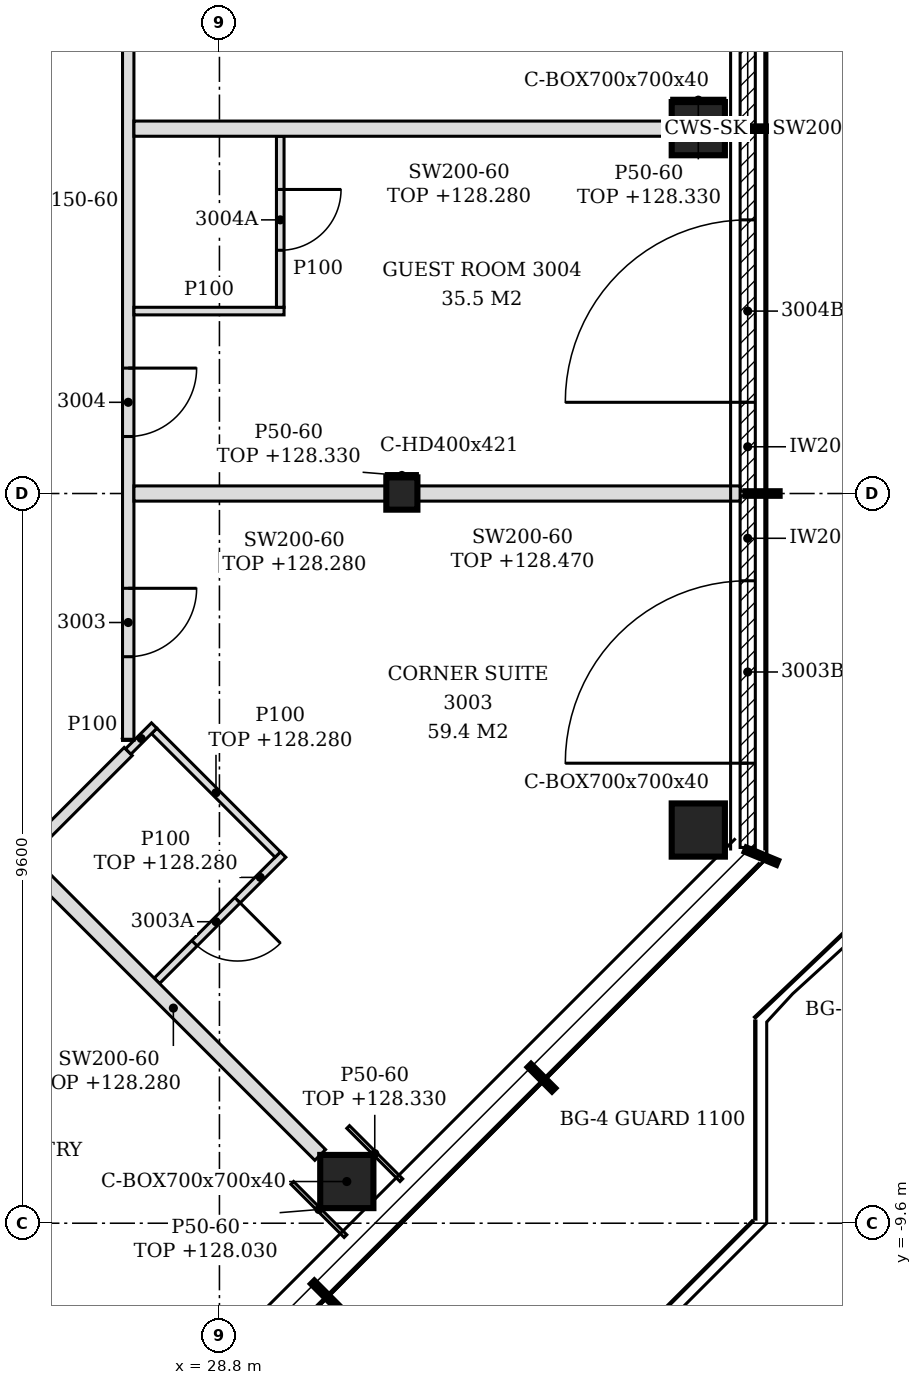
"""IFC4 building model, lengths in metres.
Left out: names, types, materials, properties, quantities, classifications, styles, units other than length and angle.
Written with IfcOpenShell. Run it as: python <this file> out.ifc"""

import sys

from ifc_helpers import new_model, si_unit, direction, frame, frame_2d, origin, origin_2d, place, context, subcontext, project, spatial, polyline, rectangle, hollow_rectangle, i_section, outline, extrude, element, fill, save


model = new_model("IFC4")
c1 = context("Model", 3, precision=1e-05, world=origin(), true_north=direction((0.0, 1.0)))
c2 = subcontext(c1, "Body", "Model", "MODEL_VIEW")
j1 = project(units=[si_unit("LENGTHUNIT", "METRE"), si_unit("PLANEANGLEUNIT", "RADIAN")], contexts=[c1])
p1 = place(None, origin())
s1 = spatial("IfcSite", under=j1, at=p1, CompositionType="ELEMENT")
p2 = place(p1, origin())
s2 = spatial("IfcBuilding", under=s1, at=p2, CompositionType="ELEMENT")
p3 = place(p2, frame((0.0, 0.0, 125.4)))
s3 = spatial("IfcBuildingStorey", under=s2, at=p3, CompositionType="ELEMENT", Elevation=125.4)
for number, where, z_axis, x_axis in (
    (1, (30.476, -9.052, -0.15), (0.0, 0.0, 1.0), (1.0, 0.0, 0.0)),
    (2, (35.1, -4.427, -0.15), (0.0, 0.0, 1.0), (1.0, 0.0, 0.0)),
    (3, (35.1, 4.8, -0.15), (0.0, 0.0, 1.0), (1.0, 0.0, 0.0)),
):
    element("IfcColumn", number, at=place(p3, frame(where, z_axis=z_axis, x_axis=x_axis)), inside=s3, PredefinedType="COLUMN", context=c2, shape_type="SweptSolid", body=[
        extrude(hollow_rectangle(XDim=0.7, YDim=0.7, WallThickness=0.04, at=origin_2d()), origin(), (0.0, 0.0, 1.0), 3.6),
    ])
p4 = place(p3, frame((31.2, 0.0, -0.15), z_axis=(0.0, 0.0, 1.0), x_axis=(1.0, 0.0, 0.0)))
e4 = element("IfcColumn", 4, at=p4, inside=s3, PredefinedType="COLUMN", context=c2, shape_type="SweptSolid", body=[
    extrude(i_section(OverallWidth=0.409, OverallDepth=0.425, WebThickness=0.033, FlangeThickness=0.052, FilletRadius=0.015, at=origin_2d()), origin(), (0.0, 0.0, 1.0), 3.6),
])
p5 = place(p3, frame((35.75, -4.656, 0.0), z_axis=(0.0, 0.0, 1.0), x_axis=(0.0, 1.0, 0.0)))
e5 = element("IfcWall", 5, at=p5, inside=s3, PredefinedType="NOTDEFINED", context=c2, shape_type="SweptSolid", body=[
    extrude(rectangle(XDim=4.626, YDim=0.2, at=frame_2d((2.313, 0.0))), origin(), (0.0, 0.0, 1.0), 3.45),
])
p6 = place(p5, frame((1.108, 0.0, 0.0)))
e6 = element("IfcOpeningElement", 6, at=p6, cuts=e5, PredefinedType="OPENING", context=c2, shape_type="SweptSolid", body=[
    extrude(rectangle(XDim=2.4, YDim=2.4, at=frame_2d((1.2, 1.2))), frame((0.0, 0.11, 0.0), z_axis=(0.0, -1.0, 0.0), x_axis=(1.0, 0.0, 0.0)), (0.0, 0.0, 1.0), 0.22),
])
p7 = place(p3, frame((35.75, 0.03, 0.0), z_axis=(0.0, 0.0, 1.0), x_axis=(0.0, 1.0, 0.0)))
e7 = element("IfcWall", 7, at=p7, inside=s3, PredefinedType="NOTDEFINED", context=c2, shape_type="SweptSolid", body=[
    extrude(rectangle(XDim=4.74, YDim=0.2, at=frame_2d((2.37, 0.0))), origin(), (0.0, 0.0, 1.0), 3.45),
])
p8 = place(p7, frame((1.17, 0.0, 0.0)))
e8 = element("IfcOpeningElement", 8, at=p8, cuts=e7, PredefinedType="OPENING", context=c2, shape_type="SweptSolid", body=[
    extrude(rectangle(XDim=2.4, YDim=2.4, at=frame_2d((1.2, 1.2))), frame((0.0, 0.11, 0.0), z_axis=(0.0, -1.0, 0.0), x_axis=(1.0, 0.0, 0.0)), (0.0, 0.0, 1.0), 0.22),
])
p9 = place(p3, frame((35.75, 4.83, 0.0), z_axis=(0.0, 0.0, 1.0), x_axis=(0.0, 1.0, 0.0)))
e9 = element("IfcWall", 9, at=p9, inside=s3, PredefinedType="NOTDEFINED", context=c2, shape_type="SweptSolid", body=[
    extrude(rectangle(XDim=4.74, YDim=0.2, at=frame_2d((2.37, 0.0))), origin(), (0.0, 0.0, 1.0), 3.45),
])
p10 = place(p9, frame((1.17, 0.0, 0.0)))
e10 = element("IfcOpeningElement", 10, at=p10, cuts=e9, PredefinedType="OPENING", context=c2, shape_type="SweptSolid", body=[
    extrude(rectangle(XDim=2.4, YDim=2.4, at=frame_2d((1.2, 1.2))), frame((0.0, 0.11, 0.0), z_axis=(0.0, -1.0, 0.0), x_axis=(1.0, 0.0, 0.0)), (0.0, 0.0, 1.0), 0.22),
])
p11 = place(p3, frame((30.125, -8.702, 0.0), z_axis=(0.0, 0.0, 1.0), x_axis=(-0.707084440093, 0.707129121574, 0.0)))
e11 = element("IfcWall", 11, at=p11, inside=s3, PredefinedType="PARTITIONING", context=c2, shape_type="SweptSolid", body=[
    extrude(rectangle(XDim=5.464, YDim=0.2, at=frame_2d((2.732, 0.0))), origin(), (0.0, 0.0, 1.0), 2.88),
])
p12 = place(p3, frame((22.722, -8.272, 0.0), z_axis=(0.0, 0.0, 1.0), x_axis=(0.707124475887, 0.707089086043, 0.0)))
e12 = element("IfcWall", 12, at=p12, inside=s3, PredefinedType="PARTITIONING", context=c2, shape_type="SweptSolid", body=[
    extrude(rectangle(XDim=6.899, YDim=0.15, at=frame_2d((3.449, 0.0))), origin(), (0.0, 0.0, 1.0), 2.88),
])
p13 = place(p12, frame((1.925, 0.0, 0.0)))
e13 = element("IfcOpeningElement", 13, at=p13, cuts=e12, PredefinedType="OPENING", context=c2, shape_type="SweptSolid", body=[
    extrude(rectangle(XDim=0.9, YDim=2.1, at=frame_2d((0.45, 1.05))), frame((0.0, 0.085, 0.0), z_axis=(0.0, -1.0, 0.0), x_axis=(1.0, 0.0, 0.0)), (0.0, 0.0, 1.0), 0.17),
])
p14 = place(p3, frame((27.977, -6.411, 0.0), z_axis=(0.0, 0.0, 1.0), x_axis=(0.707054828152, 0.707158730404, 0.0)))
e14 = element("IfcWall", 14, at=p14, inside=s3, PredefinedType="PARTITIONING", context=c2, shape_type="SweptSolid", body=[
    extrude(rectangle(XDim=2.35, YDim=0.1, at=frame_2d((1.175, 0.0))), origin(), (0.0, 0.0, 1.0), 2.88),
])
p15 = place(p14, frame((0.7, 0.0, 0.0)))
e15 = element("IfcOpeningElement", 15, at=p15, cuts=e14, PredefinedType="OPENING", context=c2, shape_type="SweptSolid", body=[
    extrude(rectangle(XDim=0.8, YDim=2.1, at=frame_2d((0.4, 1.05))), frame((0.0, 0.06, 0.0), z_axis=(0.0, -1.0, 0.0), x_axis=(1.0, 0.0, 0.0)), (0.0, 0.0, 1.0), 0.12),
])
p16 = place(p3, frame((29.568, -4.75, 0.0), z_axis=(0.0, 0.0, 1.0), x_axis=(-0.707106781187, 0.707106781187, 0.0)))
e16 = element("IfcWall", 16, at=p16, inside=s3, PredefinedType="PARTITIONING", context=c2, shape_type="SweptSolid", body=[
    extrude(rectangle(XDim=2.3, YDim=0.1, at=frame_2d((1.15, 0.0))), origin(), (0.0, 0.0, 1.0), 2.88),
])
p17 = place(p3, frame((27.6, -3.394, 0.0), z_axis=(0.0, 0.0, 1.0), x_axis=(0.707106781187, 0.707106781187, 0.0)))
e17 = element("IfcWall", 17, at=p17, inside=s3, PredefinedType="PARTITIONING", context=c2, shape_type="SweptSolid", body=[
    extrude(rectangle(XDim=0.483, YDim=0.1, at=frame_2d((0.241, 0.0))), origin(), (0.0, 0.0, 1.0), 3.45),
])
p18 = place(p3, frame((27.6, -3.248, 0.0), z_axis=(0.0, 0.0, 1.0), x_axis=(0.0, 1.0, 0.0)))
e18 = element("IfcWall", 18, at=p18, inside=s3, PredefinedType="PARTITIONING", context=c2, shape_type="SweptSolid", body=[
    extrude(outline(polyline([(0.0, 0.0), (11.548, 0.0), (11.548, 3.45), (8.153, 3.45), (8.151, 2.88), (7.943, 2.88), (7.941, 3.45), (3.353, 3.45), (3.351, 2.88), (3.143, 2.88), (3.141, 3.45), (0.0, 3.45), (0.0, 0.0)])), frame((0.0, 0.075, 0.0), z_axis=(0.0, -1.0, 0.0), x_axis=(1.0, 0.0, 0.0)), (0.0, 0.0, 1.0), 0.15),
])
p19 = place(p18, frame((1.101, 0.0, 0.0)))
e19 = element("IfcOpeningElement", 19, at=p19, cuts=e18, PredefinedType="OPENING", context=c2, shape_type="SweptSolid", body=[
    extrude(rectangle(XDim=0.9, YDim=2.1, at=frame_2d((0.45, 1.05))), frame((0.0, 0.085, 0.0), z_axis=(0.0, -1.0, 0.0), x_axis=(1.0, 0.0, 0.0)), (0.0, 0.0, 1.0), 0.17),
])
p20 = place(p18, frame((3.998, 0.0, 0.0)))
e20 = element("IfcOpeningElement", 20, at=p20, cuts=e18, PredefinedType="OPENING", context=c2, shape_type="SweptSolid", body=[
    extrude(rectangle(XDim=0.9, YDim=2.1, at=frame_2d((0.45, 1.05))), frame((0.0, 0.085, 0.0), z_axis=(0.0, -1.0, 0.0), x_axis=(1.0, 0.0, 0.0)), (0.0, 0.0, 1.0), 0.17),
])
p21 = place(p18, frame((9.295, 0.0, 0.0)))
e21 = element("IfcOpeningElement", 21, at=p21, cuts=e18, PredefinedType="OPENING", context=c2, shape_type="SweptSolid", body=[
    extrude(rectangle(XDim=0.9, YDim=2.1, at=frame_2d((0.45, 1.05))), frame((0.0, 0.085, 0.0), z_axis=(0.0, -1.0, 0.0), x_axis=(1.0, 0.0, 0.0)), (0.0, 0.0, 1.0), 0.17),
])
p22 = place(p3, frame((27.675, 0.0, 0.0), z_axis=(0.0, 0.0, 1.0), x_axis=(1.0, 0.0, 0.0)))
e22 = element("IfcWall", 22, at=p22, inside=s3, PredefinedType="PARTITIONING", context=c2, shape_type="SweptSolid", body=[
    extrude(rectangle(XDim=3.321, YDim=0.2, at=frame_2d((1.66, 0.0))), origin(), (0.0, 0.0, 1.0), 2.88),
])
p23 = place(p3, frame((31.405, 0.0, 0.0), z_axis=(0.0, 0.0, 1.0), x_axis=(1.0, 0.0, 0.0)))
e23 = element("IfcWall", 23, at=p23, inside=s3, PredefinedType="PARTITIONING", context=c2, shape_type="SweptSolid", body=[
    extrude(outline(polyline([(0.0, 0.0), (4.245, 0.0), (4.246, 3.07), (3.845, 3.07), (3.844, 2.93), (3.545, 2.93), (3.543, 3.07), (0.0, 3.07), (0.0, 0.0)])), frame((0.0, 0.1, 0.0), z_axis=(0.0, -1.0, 0.0), x_axis=(1.0, 0.0, 0.0)), (0.0, 0.0, 1.0), 0.2),
])
p24 = place(p3, frame((27.675, 2.4, 0.0), z_axis=(0.0, 0.0, 1.0), x_axis=(1.0, 0.0, 0.0)))
e24 = element("IfcWall", 24, at=p24, inside=s3, PredefinedType="PARTITIONING", context=c2, shape_type="SweptSolid", body=[
    extrude(rectangle(XDim=1.975, YDim=0.1, at=frame_2d((0.987, 0.0))), origin(), (0.0, 0.0, 1.0), 3.45),
])
p25 = place(p3, frame((29.6, 2.45, 0.0), z_axis=(0.0, 0.0, 1.0), x_axis=(0.0, 1.0, 0.0)))
e25 = element("IfcWall", 25, at=p25, inside=s3, PredefinedType="PARTITIONING", context=c2, shape_type="SweptSolid", body=[
    extrude(outline(polyline([(0.0, 0.0), (2.25, 0.0), (2.25, 2.88), (2.245, 2.88), (2.243, 3.45), (0.0, 3.45), (0.0, 0.0)])), frame((0.0, 0.05, 0.0), z_axis=(0.0, -1.0, 0.0), x_axis=(1.0, 0.0, 0.0)), (0.0, 0.0, 1.0), 0.1),
])
p26 = place(p25, frame((0.75, 0.0, 0.0)))
e26 = element("IfcOpeningElement", 26, at=p26, cuts=e25, PredefinedType="OPENING", context=c2, shape_type="SweptSolid", body=[
    extrude(rectangle(XDim=0.8, YDim=2.1, at=frame_2d((0.4, 1.05))), frame((0.0, 0.06, 0.0), z_axis=(0.0, -1.0, 0.0), x_axis=(1.0, 0.0, 0.0)), (0.0, 0.0, 1.0), 0.12),
])
p27 = place(p3, frame((27.675, 4.8, 0.0), z_axis=(0.0, 0.0, 1.0), x_axis=(1.0, 0.0, 0.0)))
e27 = element("IfcWall", 27, at=p27, inside=s3, PredefinedType="PARTITIONING", context=c2, shape_type="SweptSolid", body=[
    extrude(rectangle(XDim=7.075, YDim=0.2, at=frame_2d((3.538, 0.0))), origin(), (0.0, 0.0, 1.0), 2.88),
])
p28 = place(p3, frame((35.45, 4.8, 0.0), z_axis=(0.0, 0.0, 1.0), x_axis=(1.0, 0.0, 0.0)))
e28 = element("IfcWall", 28, at=p28, inside=s3, PredefinedType="PARTITIONING", context=c2, shape_type="SweptSolid", body=[
    extrude(rectangle(XDim=0.2, YDim=0.2, at=frame_2d((0.1, 0.0))), origin(), (0.0, 0.0, 1.0), 3.45),
])
p29 = place(p3, frame((30.458, -9.769, 0.0), z_axis=(0.0, 0.0, 1.0), x_axis=(-0.706983473703, 0.707230067171, 0.0)))
e29 = element("IfcWall", 29, at=p29, inside=s3, PredefinedType="PARTITIONING", context=c2, shape_type="SweptSolid", body=[
    extrude(rectangle(XDim=0.99, YDim=0.05, at=frame_2d((0.495, 0.0))), origin(), (0.0, 0.0, 1.0), 2.63),
])
p30 = place(p3, frame((31.193, -9.034, 0.0), z_axis=(0.0, 0.0, 1.0), x_axis=(-0.707106781187, 0.707106781187, 0.0)))
e30 = element("IfcWall", 30, at=p30, inside=s3, PredefinedType="PARTITIONING", context=c2, shape_type="SweptSolid", body=[
    extrude(rectangle(XDim=0.99, YDim=0.05, at=frame_2d((0.495, 0.0))), origin(), (0.0, 0.0, 1.0), 2.93),
])
p31 = place(p3, frame((30.996, 0.238, 0.0), z_axis=(0.0, 0.0, 1.0), x_axis=(1.0, 0.0, 0.0)))
e31 = element("IfcWall", 31, at=p31, inside=s3, PredefinedType="PARTITIONING", context=c2, shape_type="SweptSolid", body=[
    extrude(rectangle(XDim=0.409, YDim=0.05, at=frame_2d((0.205, 0.0))), origin(), (0.0, 0.0, 1.0), 2.93),
])
p32 = place(p3, frame((34.75, 5.175, 0.0), z_axis=(0.0, 0.0, 1.0), x_axis=(1.0, 0.0, 0.0)))
e32 = element("IfcWall", 32, at=p32, inside=s3, PredefinedType="PARTITIONING", context=c2, shape_type="SweptSolid", body=[
    extrude(rectangle(XDim=0.7, YDim=0.05, at=frame_2d((0.35, 0.0))), origin(), (0.0, 0.0, 1.0), 2.93),
])
p33 = place(p6, origin())
e33 = element("IfcDoor", 33, at=p33, inside=s3, OperationType="SINGLE_SWING_LEFT", PredefinedType="DOOR", context=c2, shape_type="SweptSolid", body=[
    extrude(rectangle(XDim=2.4, YDim=2.4, at=frame_2d((1.2, 1.2))), frame((0.0, 0.025, 0.0), z_axis=(0.0, -1.0, 0.0), x_axis=(1.0, 0.0, 0.0)), (0.0, 0.0, 1.0), 0.05),
])
fill(e6, e33)
p34 = place(p8, origin())
e34 = element("IfcDoor", 34, at=p34, inside=s3, OperationType="SINGLE_SWING_LEFT", PredefinedType="DOOR", context=c2, shape_type="SweptSolid", body=[
    extrude(rectangle(XDim=2.4, YDim=2.4, at=frame_2d((1.2, 1.2))), frame((0.0, 0.025, 0.0), z_axis=(0.0, -1.0, 0.0), x_axis=(1.0, 0.0, 0.0)), (0.0, 0.0, 1.0), 0.05),
])
fill(e8, e34)
p35 = place(p19, frame((0.9, 0.0, 0.0), z_axis=(0.0, 0.0, 1.0), x_axis=(-1.0, 0.0, 0.0)))
e35 = element("IfcDoor", 35, at=p35, inside=s3, OperationType="SINGLE_SWING_LEFT", PredefinedType="DOOR", context=c2, shape_type="SweptSolid", body=[
    extrude(rectangle(XDim=0.9, YDim=2.1, at=frame_2d((0.45, 1.05))), frame((0.0, 0.025, 0.0), z_axis=(0.0, -1.0, 0.0), x_axis=(1.0, 0.0, 0.0)), (0.0, 0.0, 1.0), 0.05),
])
fill(e19, e35)
p36 = place(p15, frame((0.8, 0.0, 0.0), z_axis=(0.0, 0.0, 1.0), x_axis=(-1.0, 0.0, 0.0)))
e36 = element("IfcDoor", 36, at=p36, inside=s3, OperationType="SINGLE_SWING_LEFT", PredefinedType="DOOR", context=c2, shape_type="SweptSolid", body=[
    extrude(rectangle(XDim=0.8, YDim=2.1, at=frame_2d((0.4, 1.05))), frame((0.0, 0.025, 0.0), z_axis=(0.0, -1.0, 0.0), x_axis=(1.0, 0.0, 0.0)), (0.0, 0.0, 1.0), 0.05),
])
fill(e15, e36)
p37 = place(p20, frame((0.9, 0.0, 0.0), z_axis=(0.0, 0.0, 1.0), x_axis=(-1.0, 0.0, 0.0)))
e37 = element("IfcDoor", 37, at=p37, inside=s3, OperationType="SINGLE_SWING_LEFT", PredefinedType="DOOR", context=c2, shape_type="SweptSolid", body=[
    extrude(rectangle(XDim=0.9, YDim=2.1, at=frame_2d((0.45, 1.05))), frame((0.0, 0.025, 0.0), z_axis=(0.0, -1.0, 0.0), x_axis=(1.0, 0.0, 0.0)), (0.0, 0.0, 1.0), 0.05),
])
fill(e20, e37)
p38 = place(p26, frame((0.8, 0.0, 0.0), z_axis=(0.0, 0.0, 1.0), x_axis=(-1.0, 0.0, 0.0)))
e38 = element("IfcDoor", 38, at=p38, inside=s3, OperationType="SINGLE_SWING_LEFT", PredefinedType="DOOR", context=c2, shape_type="SweptSolid", body=[
    extrude(rectangle(XDim=0.8, YDim=2.1, at=frame_2d((0.4, 1.05))), frame((0.0, 0.025, 0.0), z_axis=(0.0, -1.0, 0.0), x_axis=(1.0, 0.0, 0.0)), (0.0, 0.0, 1.0), 0.05),
])
fill(e26, e38)
save(model, sys.argv[1])
